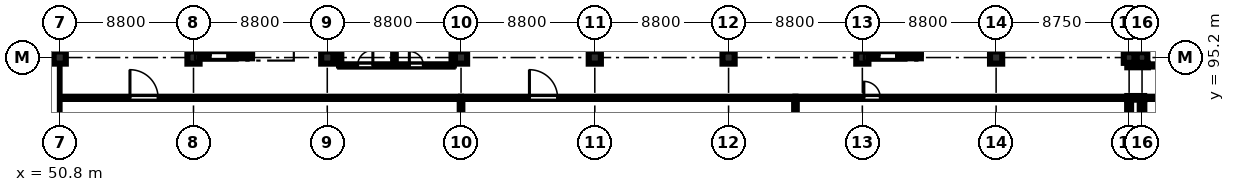
"""IFC4 building model, lengths in metres.
Left out: names, types, materials, properties, quantities, classifications, styles, units other than length and angle.
Written with IfcOpenShell. Run it as: python <this file> out.ifc"""

import sys

from ifc_helpers import new_model, si_unit, direction, frame, frame_2d, origin, origin_2d, place, context, subcontext, project, spatial, rectangle, extrude, element, fill, save


model = new_model("IFC4")
c1 = context("Model", 3, precision=1e-05, world=origin(), true_north=direction((0.0, 1.0)))
c2 = subcontext(c1, "Body", "Model", "MODEL_VIEW")
j1 = project(units=[si_unit("LENGTHUNIT", "METRE"), si_unit("PLANEANGLEUNIT", "RADIAN")], contexts=[c1])
p1 = place(None, origin())
s1 = spatial("IfcSite", under=j1, at=p1, CompositionType="ELEMENT")
p2 = place(p1, origin())
s2 = spatial("IfcBuilding", under=s1, at=p2, CompositionType="ELEMENT")
p3 = place(p2, origin())
s3 = spatial("IfcBuildingStorey", under=s2, at=p3, CompositionType="ELEMENT", Elevation=0.0)
for number, where, z_axis, x_axis in (
    (1, (50.8, 95.2, 0.0), (0.0, 0.0, 1.0), (1.0, 0.0, 0.0)),
    (2, (59.6, 95.2, 0.0), (0.0, 0.0, 1.0), (1.0, 0.0, 0.0)),
    (3, (68.4, 95.2, 0.0), (0.0, 0.0, 1.0), (1.0, 0.0, 0.0)),
    (4, (77.2, 95.2, 0.0), (0.0, 0.0, 1.0), (1.0, 0.0, 0.0)),
    (5, (86.0, 95.2, 0.0), (0.0, 0.0, 1.0), (1.0, 0.0, 0.0)),
    (6, (94.8, 95.2, 0.0), (0.0, 0.0, 1.0), (1.0, 0.0, 0.0)),
    (7, (103.6, 95.2, 0.0), (0.0, 0.0, 1.0), (1.0, 0.0, 0.0)),
    (8, (112.4, 95.2, 0.0), (0.0, 0.0, 1.0), (1.0, 0.0, 0.0)),
):
    element("IfcColumn", number, at=place(p3, frame(where, z_axis=z_axis, x_axis=x_axis)), inside=s3, PredefinedType="COLUMN", context=c2, shape_type="SweptSolid", body=[
        extrude(rectangle(XDim=0.8, YDim=0.8, at=origin_2d()), origin(), (0.0, 0.0, 1.0), 5.18),
    ])
for number, where, z_axis, x_axis in (
    (9, (121.15, 95.2, 0.0), (0.0, 0.0, 1.0), (1.0, 0.0, 0.0)),
    (10, (122.0, 95.2, 0.0), (0.0, 0.0, 1.0), (1.0, 0.0, 0.0)),
):
    element("IfcColumn", number, at=place(p3, frame(where, z_axis=z_axis, x_axis=x_axis)), inside=s3, PredefinedType="COLUMN", context=c2, shape_type="SweptSolid", body=[
        extrude(rectangle(XDim=0.7, YDim=0.7, at=origin_2d()), origin(), (0.0, 0.0, 1.0), 5.18),
    ])
p4 = place(p3, frame((59.75, 95.3, 0.0), z_axis=(0.0, 0.0, 1.0), x_axis=(1.0, 0.0, 0.0)))
e11 = element("IfcWall", 11, at=p4, inside=s3, PredefinedType="SHEAR", context=c2, shape_type="SweptSolid", body=[
    extrude(rectangle(XDim=3.7, YDim=0.3, at=frame_2d((1.85, 0.0))), origin(), (0.0, 0.0, 1.0), 5.18),
])
p5 = place(p4, frame((0.95, 0.0, 0.0)))
e12 = element("IfcOpeningElement", 12, at=p5, cuts=e11, PredefinedType="OPENING", context=c2, shape_type="SweptSolid", body=[
    extrude(rectangle(XDim=1.15, YDim=2.15, at=frame_2d((0.575, 1.075))), frame((0.0, 0.16, 0.0), z_axis=(0.0, -1.0, 0.0), x_axis=(1.0, 0.0, 0.0)), (0.0, 0.0, 1.0), 0.32),
])
for number, where, z_axis, x_axis in (
    (13, (59.9, 95.45, 0.0), (0.0, 0.0, 1.0), (0.0, 1.0, 0.0)),
    (14, (63.3, 95.45, 0.0), (0.0, 0.0, 1.0), (0.0, 1.0, 0.0)),
):
    element("IfcWall", number, at=place(p3, frame(where, z_axis=z_axis, x_axis=x_axis)), inside=s3, PredefinedType="SHEAR", context=c2, shape_type="SweptSolid", body=[
        extrude(rectangle(XDim=7.9, YDim=0.3, at=frame_2d((3.95, 0.0))), origin(), (0.0, 0.0, 1.0), 5.18),
    ])
p6 = place(p3, frame((103.75, 95.3, 0.0), z_axis=(0.0, 0.0, 1.0), x_axis=(1.0, 0.0, 0.0)))
e15 = element("IfcWall", 15, at=p6, inside=s3, PredefinedType="SHEAR", context=c2, shape_type="SweptSolid", body=[
    extrude(rectangle(XDim=3.7, YDim=0.3, at=frame_2d((1.85, 0.0))), origin(), (0.0, 0.0, 1.0), 5.18),
])
p7 = place(p6, frame((0.95, 0.0, 0.0)))
e16 = element("IfcOpeningElement", 16, at=p7, cuts=e15, PredefinedType="OPENING", context=c2, shape_type="SweptSolid", body=[
    extrude(rectangle(XDim=1.15, YDim=2.15, at=frame_2d((0.575, 1.075))), frame((0.0, 0.16, 0.0), z_axis=(0.0, -1.0, 0.0), x_axis=(1.0, 0.0, 0.0)), (0.0, 0.0, 1.0), 0.32),
])
for number, where, z_axis, x_axis in (
    (17, (103.9, 95.45, 0.0), (0.0, 0.0, 1.0), (0.0, 1.0, 0.0)),
    (18, (107.3, 95.45, 0.0), (0.0, 0.0, 1.0), (0.0, 1.0, 0.0)),
):
    element("IfcWall", number, at=place(p3, frame(where, z_axis=z_axis, x_axis=x_axis)), inside=s3, PredefinedType="SHEAR", context=c2, shape_type="SweptSolid", body=[
        extrude(rectangle(XDim=7.9, YDim=0.3, at=frame_2d((3.95, 0.0))), origin(), (0.0, 0.0, 1.0), 5.18),
    ])
p8 = place(p3, frame((121.15, 92.42, 0.0), z_axis=(0.0, 0.0, 1.0), x_axis=(0.0, -1.0, 0.0)))
e19 = element("IfcWall", 19, at=p8, inside=s3, PredefinedType="STANDARD", context=c2, shape_type="SweptSolid", body=[
    extrude(rectangle(XDim=5.27, YDim=0.26, at=frame_2d((2.635, 0.0))), origin(), (0.0, 0.0, 1.0), 4.53),
])
p9 = place(p3, frame((121.15, 103.25, 0.0), z_axis=(0.0, 0.0, 1.0), x_axis=(0.0, -1.0, 0.0)))
e20 = element("IfcWall", 20, at=p9, inside=s3, PredefinedType="STANDARD", context=c2, shape_type="SweptSolid", body=[
    extrude(rectangle(XDim=7.7, YDim=0.26, at=frame_2d((3.85, 0.0))), origin(), (0.0, 0.0, 1.0), 4.53),
])
p10 = place(p3, frame((122.0, 87.15, 0.0), z_axis=(0.0, 0.0, 1.0), x_axis=(0.0, 1.0, 0.0)))
e21 = element("IfcWall", 21, at=p10, inside=s3, PredefinedType="STANDARD", context=c2, shape_type="SweptSolid", body=[
    extrude(rectangle(XDim=5.27, YDim=0.3, at=frame_2d((2.635, 0.0))), origin(), (0.0, 0.0, 1.0), 4.43),
])
p11 = place(p3, frame((122.14, 92.55, 0.0), z_axis=(0.0, 0.0, 1.0), x_axis=(-1.0, 0.0, 0.0)))
e22 = element("IfcWall", 22, at=p11, inside=s3, PredefinedType="STANDARD", context=c2, shape_type="SweptSolid", body=[
    extrude(rectangle(XDim=1.11, YDim=0.24, at=frame_2d((0.555, 0.0))), origin(), (0.0, 0.0, 1.0), 5.18),
])
p12 = place(p3, frame((121.03, 94.68, 0.0), z_axis=(0.0, 0.0, 1.0), x_axis=(1.0, 0.0, 0.0)))
e23 = element("IfcWall", 23, at=p12, inside=s3, PredefinedType="STANDARD", context=c2, shape_type="SweptSolid", body=[
    extrude(rectangle(XDim=1.36, YDim=0.24, at=frame_2d((0.68, 0.0))), origin(), (0.0, 0.0, 1.0), 5.18),
])
p13 = place(p3, frame((122.0, 95.55, 0.0), z_axis=(0.0, 0.0, 1.0), x_axis=(0.0, 1.0, 0.0)))
e24 = element("IfcWall", 24, at=p13, inside=s3, PredefinedType="STANDARD", context=c2, shape_type="SweptSolid", body=[
    extrude(rectangle(XDim=7.7, YDim=0.3, at=frame_2d((3.85, 0.0))), origin(), (0.0, 0.0, 1.0), 4.43),
])
p14 = place(p3, frame((69.25, 94.68, 0.0), z_axis=(0.0, 0.0, 1.0), x_axis=(1.0, 0.0, 0.0)))
e25 = element("IfcWall", 25, at=p14, inside=s3, PredefinedType="PARTITIONING", context=c2, shape_type="SweptSolid", body=[
    extrude(rectangle(XDim=7.4, YDim=0.15, at=frame_2d((3.7, 0.0))), origin(), (0.0, 0.0, 1.0), 5.18),
])
p15 = place(p14, frame((1.15, 0.0, 0.0)))
e26 = element("IfcOpeningElement", 26, at=p15, cuts=e25, PredefinedType="OPENING", context=c2, shape_type="SweptSolid", body=[
    extrude(rectangle(XDim=1.0, YDim=2.12, at=frame_2d((0.5, 1.06))), frame((0.0, 0.085, 0.0), z_axis=(0.0, -1.0, 0.0), x_axis=(1.0, 0.0, 0.0)), (0.0, 0.0, 1.0), 0.17),
])
p16 = place(p14, frame((4.55, 0.0, 0.0)))
e27 = element("IfcOpeningElement", 27, at=p16, cuts=e25, PredefinedType="OPENING", context=c2, shape_type="SweptSolid", body=[
    extrude(rectangle(XDim=0.92, YDim=2.1, at=frame_2d((0.46, 1.05))), frame((0.0, 0.085, 0.0), z_axis=(0.0, -1.0, 0.0), x_axis=(1.0, 0.0, 0.0)), (0.0, 0.0, 1.0), 0.17),
])
p17 = place(p3, frame((69.25, 94.68, 0.0), z_axis=(0.0, 0.0, 1.0), x_axis=(0.0, 1.0, 0.0)))
e28 = element("IfcWall", 28, at=p17, inside=s3, PredefinedType="PARTITIONING", context=c2, shape_type="SweptSolid", body=[
    extrude(rectangle(XDim=8.57, YDim=0.15, at=frame_2d((4.285, 0.0))), origin(), (0.0, 0.0, 1.0), 5.18),
])
p18 = place(p3, frame((72.82, 94.68, 0.0), z_axis=(0.0, 0.0, 1.0), x_axis=(0.0, 1.0, 0.0)))
e29 = element("IfcWall", 29, at=p18, inside=s3, PredefinedType="PARTITIONING", context=c2, shape_type="SweptSolid", body=[
    extrude(rectangle(XDim=8.57, YDim=0.172, at=frame_2d((4.285, 0.0))), origin(), (0.0, 0.0, 1.0), 4.73),
])
p19 = place(p3, frame((76.65, 94.68, 0.0), z_axis=(0.0, 0.0, 1.0), x_axis=(0.0, 1.0, 0.0)))
e30 = element("IfcWall", 30, at=p19, inside=s3, PredefinedType="PARTITIONING", context=c2, shape_type="SweptSolid", body=[
    extrude(rectangle(XDim=8.57, YDim=0.15, at=frame_2d((4.285, 0.0))), origin(), (0.0, 0.0, 1.0), 5.18),
])
p20 = place(p3, frame((50.92, 92.55, 0.0), z_axis=(0.0, 0.0, 1.0), x_axis=(1.0, 0.0, 0.0)))
e31 = element("IfcWall", 31, at=p20, inside=s3, PredefinedType="PARTITIONING", context=c2, shape_type="SweptSolid", body=[
    extrude(rectangle(XDim=26.28, YDim=0.145, at=frame_2d((13.14, 0.0))), origin(), (0.0, 0.0, 1.0), 5.18),
])
p21 = place(p20, frame((4.5, 0.0, 0.0)))
e32 = element("IfcOpeningElement", 32, at=p21, cuts=e31, PredefinedType="OPENING", context=c2, shape_type="SweptSolid", body=[
    extrude(rectangle(XDim=1.85, YDim=2.25, at=frame_2d((0.925, 1.125))), frame((0.0, 0.083, 0.0), z_axis=(0.0, -1.0, 0.0), x_axis=(1.0, 0.0, 0.0)), (0.0, 0.0, 1.0), 0.165),
])
p22 = place(p3, frame((77.2, 92.55, 0.0), z_axis=(0.0, 0.0, 1.0), x_axis=(1.0, 0.0, 0.0)))
e33 = element("IfcWall", 33, at=p22, inside=s3, PredefinedType="PARTITIONING", context=c2, shape_type="SweptSolid", body=[
    extrude(rectangle(XDim=22.0, YDim=0.145, at=frame_2d((11.0, 0.0))), origin(), (0.0, 0.0, 1.0), 5.18),
])
p23 = place(p22, frame((4.5, 0.0, 0.0)))
e34 = element("IfcOpeningElement", 34, at=p23, cuts=e33, PredefinedType="OPENING", context=c2, shape_type="SweptSolid", body=[
    extrude(rectangle(XDim=1.85, YDim=2.25, at=frame_2d((0.925, 1.125))), frame((0.0, 0.083, 0.0), z_axis=(0.0, -1.0, 0.0), x_axis=(1.0, 0.0, 0.0)), (0.0, 0.0, 1.0), 0.165),
])
p24 = place(p3, frame((77.2, 86.95, 0.0), z_axis=(0.0, 0.0, 1.0), x_axis=(0.0, 1.0, 0.0)))
e35 = element("IfcWall", 35, at=p24, inside=s3, PredefinedType="PARTITIONING", context=c2, shape_type="SweptSolid", body=[
    extrude(rectangle(XDim=5.6, YDim=0.172, at=frame_2d((2.8, 0.0))), origin(), (0.0, 0.0, 1.0), 4.53),
])
p25 = place(p3, frame((99.2, 92.55, 0.0), z_axis=(0.0, 0.0, 1.0), x_axis=(1.0, 0.0, 0.0)))
e36 = element("IfcWall", 36, at=p25, inside=s3, PredefinedType="PARTITIONING", context=c2, shape_type="SweptSolid", body=[
    extrude(rectangle(XDim=21.82, YDim=0.145, at=frame_2d((10.91, 0.0))), origin(), (0.0, 0.0, 1.0), 5.18),
])
p26 = place(p25, frame((4.5, 0.0, 0.0)))
e37 = element("IfcOpeningElement", 37, at=p26, cuts=e36, PredefinedType="OPENING", context=c2, shape_type="SweptSolid", body=[
    extrude(rectangle(XDim=1.08, YDim=2.15, at=frame_2d((0.54, 1.075))), frame((0.0, 0.083, 0.0), z_axis=(0.0, -1.0, 0.0), x_axis=(1.0, 0.0, 0.0)), (0.0, 0.0, 1.0), 0.165),
])
p27 = place(p3, frame((99.2, 86.95, 0.0), z_axis=(0.0, 0.0, 1.0), x_axis=(0.0, 1.0, 0.0)))
e38 = element("IfcWall", 38, at=p27, inside=s3, PredefinedType="PARTITIONING", context=c2, shape_type="SweptSolid", body=[
    extrude(rectangle(XDim=5.6, YDim=0.172, at=frame_2d((2.8, 0.0))), origin(), (0.0, 0.0, 1.0), 4.73),
])
p28 = place(p3, frame((122.4, 94.68, 0.0), z_axis=(0.0, 0.0, 1.0), x_axis=(1.0, 0.0, 0.0)))
e39 = element("IfcWall", 39, at=p28, inside=s3, PredefinedType="PARTITIONING", context=c2, shape_type="SweptSolid", body=[
    extrude(rectangle(XDim=8.4, YDim=0.145, at=frame_2d((4.2, 0.0))), origin(), (0.0, 0.0, 1.0), 5.18),
])
p29 = place(p28, frame((3.4, 0.0, 0.0)))
e40 = element("IfcOpeningElement", 40, at=p29, cuts=e39, PredefinedType="OPENING", context=c2, shape_type="SweptSolid", body=[
    extrude(rectangle(XDim=1.08, YDim=2.15, at=frame_2d((0.54, 1.075))), frame((0.0, 0.083, 0.0), z_axis=(0.0, -1.0, 0.0), x_axis=(1.0, 0.0, 0.0)), (0.0, 0.0, 1.0), 0.165),
])
p30 = place(p3, frame((122.15, 92.55, 0.0), z_axis=(0.0, 0.0, 1.0), x_axis=(1.0, 0.0, 0.0)))
e41 = element("IfcWall", 41, at=p30, inside=s3, PredefinedType="PARTITIONING", context=c2, shape_type="SweptSolid", body=[
    extrude(rectangle(XDim=12.45, YDim=0.145, at=frame_2d((6.225, 0.0))), origin(), (0.0, 0.0, 1.0), 5.18),
])
p31 = place(p30, frame((3.75, 0.0, 0.0)))
e42 = element("IfcOpeningElement", 42, at=p31, cuts=e41, PredefinedType="OPENING", context=c2, shape_type="SweptSolid", body=[
    extrude(rectangle(XDim=1.02, YDim=2.15, at=frame_2d((0.51, 1.075))), frame((0.0, 0.083, 0.0), z_axis=(0.0, -1.0, 0.0), x_axis=(1.0, 0.0, 0.0)), (0.0, 0.0, 1.0), 0.165),
])
p32 = place(p15, origin())
e43 = element("IfcDoor", 43, at=p32, inside=s3, OperationType="SINGLE_SWING_RIGHT", PredefinedType="DOOR", context=c2, shape_type="SweptSolid", body=[
    extrude(rectangle(XDim=1.0, YDim=2.12, at=frame_2d((0.5, 1.06))), frame((0.0, 0.025, 0.0), z_axis=(0.0, -1.0, 0.0), x_axis=(1.0, 0.0, 0.0)), (0.0, 0.0, 1.0), 0.05),
])
fill(e26, e43)
p33 = place(p16, origin())
e44 = element("IfcDoor", 44, at=p33, inside=s3, OperationType="SINGLE_SWING_LEFT", PredefinedType="DOOR", context=c2, shape_type="SweptSolid", body=[
    extrude(rectangle(XDim=0.92, YDim=2.1, at=frame_2d((0.46, 1.05))), frame((0.0, 0.025, 0.0), z_axis=(0.0, -1.0, 0.0), x_axis=(1.0, 0.0, 0.0)), (0.0, 0.0, 1.0), 0.05),
])
fill(e27, e44)
p34 = place(p21, origin())
e45 = element("IfcDoor", 45, at=p34, inside=s3, OperationType="SINGLE_SWING_LEFT", PredefinedType="DOOR", context=c2, shape_type="SweptSolid", body=[
    extrude(rectangle(XDim=1.85, YDim=2.25, at=frame_2d((0.925, 1.125))), frame((0.0, 0.025, 0.0), z_axis=(0.0, -1.0, 0.0), x_axis=(1.0, 0.0, 0.0)), (0.0, 0.0, 1.0), 0.05),
])
fill(e32, e45)
p35 = place(p23, origin())
e46 = element("IfcDoor", 46, at=p35, inside=s3, OperationType="SINGLE_SWING_LEFT", PredefinedType="DOOR", context=c2, shape_type="SweptSolid", body=[
    extrude(rectangle(XDim=1.85, YDim=2.25, at=frame_2d((0.925, 1.125))), frame((0.0, 0.025, 0.0), z_axis=(0.0, -1.0, 0.0), x_axis=(1.0, 0.0, 0.0)), (0.0, 0.0, 1.0), 0.05),
])
fill(e34, e46)
p36 = place(p26, origin())
e47 = element("IfcDoor", 47, at=p36, inside=s3, OperationType="SINGLE_SWING_LEFT", PredefinedType="DOOR", context=c2, shape_type="SweptSolid", body=[
    extrude(rectangle(XDim=1.08, YDim=2.15, at=frame_2d((0.54, 1.075))), frame((0.0, 0.025, 0.0), z_axis=(0.0, -1.0, 0.0), x_axis=(1.0, 0.0, 0.0)), (0.0, 0.0, 1.0), 0.05),
])
fill(e37, e47)
p37 = place(p5, origin())
e48 = element("IfcDoor", 48, at=p37, inside=s3, OperationType="SINGLE_SWING_LEFT", PredefinedType="DOOR", context=c2, shape_type="SweptSolid", body=[
    extrude(rectangle(XDim=1.15, YDim=2.15, at=frame_2d((0.575, 1.075))), frame((0.0, 0.025, 0.0), z_axis=(0.0, -1.0, 0.0), x_axis=(1.0, 0.0, 0.0)), (0.0, 0.0, 1.0), 0.05),
])
fill(e12, e48)
p38 = place(p7, origin())
e49 = element("IfcDoor", 49, at=p38, inside=s3, OperationType="SINGLE_SWING_LEFT", PredefinedType="DOOR", context=c2, shape_type="SweptSolid", body=[
    extrude(rectangle(XDim=1.15, YDim=2.15, at=frame_2d((0.575, 1.075))), frame((0.0, 0.025, 0.0), z_axis=(0.0, -1.0, 0.0), x_axis=(1.0, 0.0, 0.0)), (0.0, 0.0, 1.0), 0.05),
])
fill(e16, e49)
save(model, sys.argv[1])
